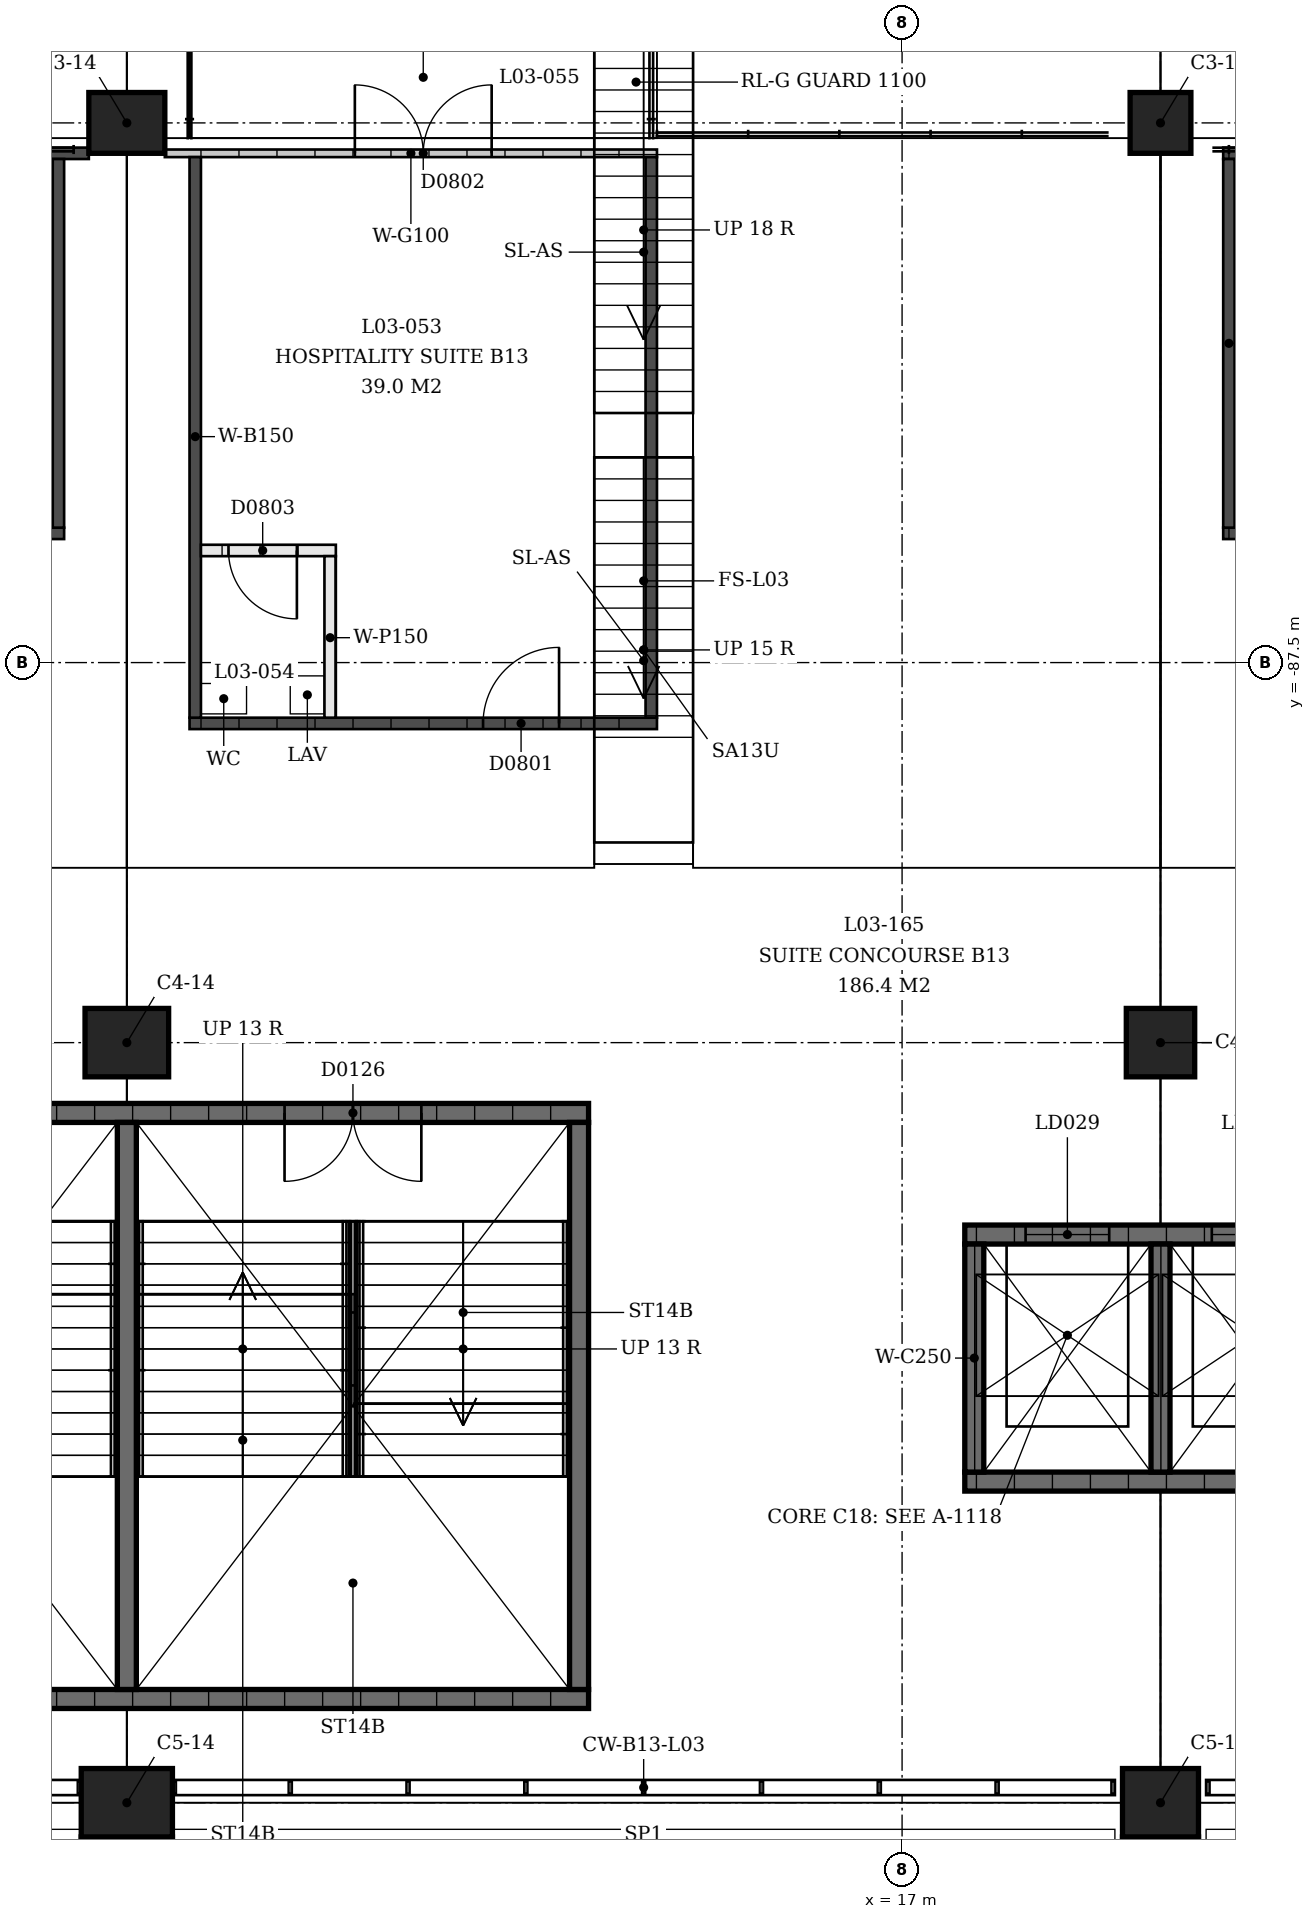
"""IFC4 building model, lengths in metres.
Left out: names, types, materials, properties, quantities, classifications, styles, units other than length and angle.
Written with IfcOpenShell. Run it as: python <this file> out.ifc"""

import sys

from ifc_helpers import new_model, si_unit, direction, frame, frame_2d, origin, origin_2d, place, context, subcontext, project, spatial, rectangle, extrude, element, fill, save


model = new_model("IFC4")
c1 = context("Model", 3, precision=1e-05, world=origin(), true_north=direction((0.0, 1.0)))
c2 = subcontext(c1, "Body", "Model", "MODEL_VIEW")
j1 = project(units=[si_unit("LENGTHUNIT", "METRE"), si_unit("PLANEANGLEUNIT", "RADIAN")], contexts=[c1])
p1 = place(None, origin())
s1 = spatial("IfcSite", under=j1, at=p1, CompositionType="ELEMENT")
p2 = place(p1, origin())
s2 = spatial("IfcBuilding", under=s1, at=p2, CompositionType="ELEMENT")
p3 = place(p2, frame((0.0, 0.0, 13.5)))
s3 = spatial("IfcBuildingStorey", under=s2, at=p3, CompositionType="ELEMENT", Elevation=13.5)
p4 = place(p3, frame((20.4, -80.4, 0.0), z_axis=(0.0, 0.0, 1.0), x_axis=(1.0, 0.0, 0.0)))
e1 = element("IfcColumn", 1, at=p4, inside=s3, PredefinedType="COLUMN", context=c2, shape_type="SweptSolid", body=[
    extrude(rectangle(XDim=0.8, YDim=0.8, at=origin_2d()), origin(), (0.0, 0.0, 1.0), 2.033),
])
p5 = place(p3, frame((20.4, -92.5, 0.0), z_axis=(0.0, 0.0, 1.0), x_axis=(1.0, 0.0, 0.0)))
e2 = element("IfcColumn", 2, at=p5, inside=s3, PredefinedType="COLUMN", context=c2, shape_type="SweptSolid", body=[
    extrude(rectangle(XDim=0.9, YDim=0.9, at=origin_2d()), origin(), (0.0, 0.0, 1.0), 4.5),
])
p6 = place(p3, frame((20.4, -102.5, 0.0), z_axis=(0.0, 0.0, 1.0), x_axis=(1.0, 0.0, 0.0)))
e3 = element("IfcColumn", 3, at=p6, inside=s3, PredefinedType="COLUMN", context=c2, shape_type="SweptSolid", body=[
    extrude(rectangle(XDim=1.0, YDim=0.9, at=origin_2d()), origin(), (0.0, 0.0, 1.0), 4.5),
])
p7 = place(p3, frame((6.8, -80.4, 0.0), z_axis=(0.0, 0.0, 1.0), x_axis=(1.0, 0.0, 0.0)))
e4 = element("IfcColumn", 4, at=p7, inside=s3, PredefinedType="COLUMN", context=c2, shape_type="SweptSolid", body=[
    extrude(rectangle(XDim=1.0, YDim=0.8, at=origin_2d()), origin(), (0.0, 0.0, 1.0), 2.033),
])
p8 = place(p3, frame((6.8, -92.5, 0.0), z_axis=(0.0, 0.0, 1.0), x_axis=(1.0, 0.0, 0.0)))
e5 = element("IfcColumn", 5, at=p8, inside=s3, PredefinedType="COLUMN", context=c2, shape_type="SweptSolid", body=[
    extrude(rectangle(XDim=1.1, YDim=0.9, at=origin_2d()), origin(), (0.0, 0.0, 1.0), 4.5),
])
p9 = place(p3, frame((6.8, -102.5, 0.0), z_axis=(0.0, 0.0, 1.0), x_axis=(1.0, 0.0, 0.0)))
e6 = element("IfcColumn", 6, at=p9, inside=s3, PredefinedType="COLUMN", context=c2, shape_type="SweptSolid", body=[
    extrude(rectangle(XDim=1.2, YDim=0.9, at=origin_2d()), origin(), (0.0, 0.0, 1.0), 4.5),
])
p10 = place(p3, frame((0.725, -93.425, 0.0), z_axis=(0.0, 0.0, 1.0), x_axis=(1.0, 0.0, 0.0)))
e7 = element("IfcWall", 7, at=p10, inside=s3, PredefinedType="SHEAR", context=c2, shape_type="SweptSolid", body=[
    extrude(rectangle(XDim=12.15, YDim=0.25, at=frame_2d((6.075, 0.0))), origin(), (0.0, 0.0, 1.0), 4.09),
])
p11 = place(p10, frame((2.2, 0.0, 0.0)))
e8 = element("IfcOpeningElement", 8, at=p11, cuts=e7, PredefinedType="OPENING", context=c2, shape_type="SweptSolid", body=[
    extrude(rectangle(XDim=1.8, YDim=2.1, at=frame_2d((0.9, 1.05))), frame((0.0, 0.125, 0.0), z_axis=(0.0, -1.0, 0.0), x_axis=(1.0, 0.0, 0.0)), (0.0, 0.0, 1.0), 0.25),
])
p12 = place(p10, frame((8.15, 0.0, 0.0)))
e9 = element("IfcOpeningElement", 9, at=p12, cuts=e7, PredefinedType="OPENING", context=c2, shape_type="SweptSolid", body=[
    extrude(rectangle(XDim=1.8, YDim=2.1, at=frame_2d((0.9, 1.05))), frame((0.0, 0.125, 0.0), z_axis=(0.0, -1.0, 0.0), x_axis=(1.0, 0.0, 0.0)), (0.0, 0.0, 1.0), 0.25),
])
p13 = place(p3, frame((0.725, -101.135, 0.0), z_axis=(0.0, 0.0, 1.0), x_axis=(1.0, 0.0, 0.0)))
e10 = element("IfcWall", 10, at=p13, inside=s3, PredefinedType="SHEAR", context=c2, shape_type="SweptSolid", body=[
    extrude(rectangle(XDim=12.15, YDim=0.25, at=frame_2d((6.075, 0.0))), origin(), (0.0, 0.0, 1.0), 4.09),
])
for number, where, z_axis, x_axis in (
    (11, (12.75, -93.55, 0.0), (0.0, 0.0, 1.0), (0.0, -1.0, 0.0)),
    (12, (6.8, -93.55, 0.0), (0.0, 0.0, 1.0), (0.0, -1.0, 0.0)),
):
    element("IfcWall", number, at=place(p3, frame(where, z_axis=z_axis, x_axis=x_axis)), inside=s3, PredefinedType="SHEAR", context=c2, shape_type="SweptSolid", body=[
        extrude(rectangle(XDim=7.46, YDim=0.25, at=frame_2d((3.73, 0.0))), origin(), (0.0, 0.0, 1.0), 4.09),
    ])
p14 = place(p3, frame((17.825, -95.025, 0.0), z_axis=(0.0, 0.0, 1.0), x_axis=(1.0, 0.0, 0.0)))
e13 = element("IfcWall", 13, at=p14, inside=s3, PredefinedType="SHEAR", context=c2, shape_type="SweptSolid", body=[
    extrude(rectangle(XDim=5.15, YDim=0.25, at=frame_2d((2.575, 0.0))), origin(), (0.0, 0.0, 1.0), 4.09),
])
p15 = place(p14, frame((0.8, 0.0, 0.0)))
e14 = element("IfcOpeningElement", 14, at=p15, cuts=e13, PredefinedType="OPENING", context=c2, shape_type="SweptSolid", body=[
    extrude(rectangle(XDim=1.1, YDim=2.1, at=frame_2d((0.55, 1.05))), frame((0.0, 0.125, 0.0), z_axis=(0.0, -1.0, 0.0), x_axis=(1.0, 0.0, 0.0)), (0.0, 0.0, 1.0), 0.25),
])
p16 = place(p14, frame((3.25, 0.0, 0.0)))
e15 = element("IfcOpeningElement", 15, at=p16, cuts=e13, PredefinedType="OPENING", context=c2, shape_type="SweptSolid", body=[
    extrude(rectangle(XDim=1.1, YDim=2.1, at=frame_2d((0.55, 1.05))), frame((0.0, 0.125, 0.0), z_axis=(0.0, -1.0, 0.0), x_axis=(1.0, 0.0, 0.0)), (0.0, 0.0, 1.0), 0.25),
])
p17 = place(p3, frame((17.825, -98.275, 0.0), z_axis=(0.0, 0.0, 1.0), x_axis=(1.0, 0.0, 0.0)))
e16 = element("IfcWall", 16, at=p17, inside=s3, PredefinedType="SHEAR", context=c2, shape_type="SweptSolid", body=[
    extrude(rectangle(XDim=5.15, YDim=0.25, at=frame_2d((2.575, 0.0))), origin(), (0.0, 0.0, 1.0), 4.09),
])
for number, where, z_axis, x_axis in (
    (17, (17.95, -95.15, 0.0), (0.0, 0.0, 1.0), (0.0, -1.0, 0.0)),
    (18, (20.4, -95.15, 0.0), (0.0, 0.0, 1.0), (0.0, -1.0, 0.0)),
):
    element("IfcWall", number, at=place(p3, frame(where, z_axis=z_axis, x_axis=x_axis)), inside=s3, PredefinedType="SHEAR", context=c2, shape_type="SweptSolid", body=[
        extrude(rectangle(XDim=3.0, YDim=0.25, at=frame_2d((1.5, 0.0))), origin(), (0.0, 0.0, 1.0), 4.09),
    ])
p18 = place(p3, frame((33.5, -80.8, 0.0), z_axis=(0.0, 0.0, 1.0), x_axis=(-1.0, 0.0, 0.0)))
e19 = element("IfcWall", 19, at=p18, inside=s3, PredefinedType="SOLIDWALL", context=c2, shape_type="SweptSolid", body=[
    extrude(rectangle(XDim=12.275, YDim=0.15, at=frame_2d((6.137, 0.0))), origin(), (0.0, 0.0, 1.0), 3.0),
])
p19 = place(p3, frame((33.175, -85.8, 0.0), z_axis=(0.0, 0.0, 1.0), x_axis=(-1.0, 0.0, 0.0)))
e20 = element("IfcWall", 20, at=p19, inside=s3, PredefinedType="SOLIDWALL", context=c2, shape_type="SweptSolid", body=[
    extrude(rectangle(XDim=11.95, YDim=0.15, at=frame_2d((5.975, 0.0))), origin(), (0.0, 0.0, 1.0), 3.0),
])
p20 = place(p19, frame((2.525, 0.0, 0.0)))
e21 = element("IfcOpeningElement", 21, at=p20, cuts=e20, PredefinedType="OPENING", context=c2, shape_type="SweptSolid", body=[
    extrude(rectangle(XDim=1.0, YDim=2.1, at=frame_2d((0.5, 1.05))), frame((0.0, 0.075, 0.0), z_axis=(0.0, -1.0, 0.0), x_axis=(1.0, 0.0, 0.0)), (0.0, 0.0, 1.0), 0.15),
])
p21 = place(p19, frame((8.425, 0.0, 0.0)))
e22 = element("IfcOpeningElement", 22, at=p21, cuts=e20, PredefinedType="OPENING", context=c2, shape_type="SweptSolid", body=[
    extrude(rectangle(XDim=1.0, YDim=2.1, at=frame_2d((0.5, 1.05))), frame((0.0, 0.075, 0.0), z_axis=(0.0, -1.0, 0.0), x_axis=(1.0, 0.0, 0.0)), (0.0, 0.0, 1.0), 0.15),
])
p22 = place(p3, frame((21.3, -80.875, 0.0), z_axis=(0.0, 0.0, 1.0), x_axis=(0.0, -1.0, 0.0)))
e23 = element("IfcWall", 23, at=p22, inside=s3, PredefinedType="SOLIDWALL", context=c2, shape_type="SweptSolid", body=[
    extrude(rectangle(XDim=4.85, YDim=0.15, at=frame_2d((2.425, 0.0))), origin(), (0.0, 0.0, 1.0), 3.0),
])
p23 = place(p3, frame((7.3, -80.8, 0.0), z_axis=(0.0, 0.0, 1.0), x_axis=(1.0, 0.0, 0.0)))
e24 = element("IfcWall", 24, at=p23, inside=s3, PredefinedType="PARTITIONING", context=c2, shape_type="SweptSolid", body=[
    extrude(rectangle(XDim=6.475, YDim=0.1, at=frame_2d((3.237, 0.0))), origin(), (0.0, 0.0, 1.0), 3.0),
])
p24 = place(p23, frame((2.5, 0.0, 0.0)))
e25 = element("IfcOpeningElement", 25, at=p24, cuts=e24, PredefinedType="OPENING", context=c2, shape_type="SweptSolid", body=[
    extrude(rectangle(XDim=1.8, YDim=2.1, at=frame_2d((0.9, 1.05))), frame((0.0, 0.05, 0.0), z_axis=(0.0, -1.0, 0.0), x_axis=(1.0, 0.0, 0.0)), (0.0, 0.0, 1.0), 0.1),
])
p25 = place(p3, frame((7.625, -88.3, 0.0), z_axis=(0.0, 0.0, 1.0), x_axis=(1.0, 0.0, 0.0)))
e26 = element("IfcWall", 26, at=p25, inside=s3, PredefinedType="SOLIDWALL", context=c2, shape_type="SweptSolid", body=[
    extrude(rectangle(XDim=6.15, YDim=0.15, at=frame_2d((3.075, 0.0))), origin(), (0.0, 0.0, 1.0), 3.0),
])
p26 = place(p25, frame((3.862, 0.0, 0.0)))
e27 = element("IfcOpeningElement", 27, at=p26, cuts=e26, PredefinedType="OPENING", context=c2, shape_type="SweptSolid", body=[
    extrude(rectangle(XDim=1.0, YDim=2.1, at=frame_2d((0.5, 1.05))), frame((0.0, 0.075, 0.0), z_axis=(0.0, -1.0, 0.0), x_axis=(1.0, 0.0, 0.0)), (0.0, 0.0, 1.0), 0.15),
])
for number, where, z_axis, x_axis in (
    (28, (7.7, -80.85, 0.0), (0.0, 0.0, 1.0), (0.0, -1.0, 0.0)),
    (29, (13.7, -80.85, 0.0), (0.0, 0.0, 1.0), (0.0, -1.0, 0.0)),
):
    element("IfcWall", number, at=place(p3, frame(where, z_axis=z_axis, x_axis=x_axis)), inside=s3, PredefinedType="SOLIDWALL", context=c2, shape_type="SweptSolid", body=[
        extrude(rectangle(XDim=7.375, YDim=0.15, at=frame_2d((3.688, 0.0))), origin(), (0.0, 0.0, 1.0), 3.0),
    ])
p27 = place(p3, frame((7.775, -86.025, 0.0), z_axis=(0.0, 0.0, 1.0), x_axis=(1.0, 0.0, 0.0)))
e30 = element("IfcWall", 30, at=p27, inside=s3, PredefinedType="PARTITIONING", context=c2, shape_type="SweptSolid", body=[
    extrude(rectangle(XDim=1.775, YDim=0.15, at=frame_2d((0.888, 0.0))), origin(), (0.0, 0.0, 1.0), 3.0),
])
p28 = place(p27, frame((0.363, 0.0, 0.0)))
e31 = element("IfcOpeningElement", 31, at=p28, cuts=e30, PredefinedType="OPENING", context=c2, shape_type="SweptSolid", body=[
    extrude(rectangle(XDim=0.9, YDim=2.1, at=frame_2d((0.45, 1.05))), frame((0.0, 0.075, 0.0), z_axis=(0.0, -1.0, 0.0), x_axis=(1.0, 0.0, 0.0)), (0.0, 0.0, 1.0), 0.15),
])
p29 = place(p3, frame((9.475, -86.1, 0.0), z_axis=(0.0, 0.0, 1.0), x_axis=(0.0, -1.0, 0.0)))
e32 = element("IfcWall", 32, at=p29, inside=s3, PredefinedType="PARTITIONING", context=c2, shape_type="SweptSolid", body=[
    extrude(rectangle(XDim=2.125, YDim=0.15, at=frame_2d((1.062, 0.0))), origin(), (0.0, 0.0, 1.0), 3.0),
])
p30 = place(p3, frame((6.3, -80.8, 0.0), z_axis=(0.0, 0.0, 1.0), x_axis=(-1.0, 0.0, 0.0)))
e33 = element("IfcWall", 33, at=p30, inside=s3, PredefinedType="SOLIDWALL", context=c2, shape_type="SweptSolid", body=[
    extrude(rectangle(XDim=12.275, YDim=0.15, at=frame_2d((6.138, 0.0))), origin(), (0.0, 0.0, 1.0), 3.0),
])
p31 = place(p3, frame((5.975, -85.8, 0.0), z_axis=(0.0, 0.0, 1.0), x_axis=(-1.0, 0.0, 0.0)))
e34 = element("IfcWall", 34, at=p31, inside=s3, PredefinedType="SOLIDWALL", context=c2, shape_type="SweptSolid", body=[
    extrude(rectangle(XDim=11.95, YDim=0.15, at=frame_2d((5.975, 0.0))), origin(), (0.0, 0.0, 1.0), 3.0),
])
p32 = place(p31, frame((2.525, 0.0, 0.0)))
e35 = element("IfcOpeningElement", 35, at=p32, cuts=e34, PredefinedType="OPENING", context=c2, shape_type="SweptSolid", body=[
    extrude(rectangle(XDim=1.0, YDim=2.1, at=frame_2d((0.5, 1.05))), frame((0.0, 0.075, 0.0), z_axis=(0.0, -1.0, 0.0), x_axis=(1.0, 0.0, 0.0)), (0.0, 0.0, 1.0), 0.15),
])
p33 = place(p31, frame((8.425, 0.0, 0.0)))
e36 = element("IfcOpeningElement", 36, at=p33, cuts=e34, PredefinedType="OPENING", context=c2, shape_type="SweptSolid", body=[
    extrude(rectangle(XDim=1.0, YDim=2.1, at=frame_2d((0.5, 1.05))), frame((0.0, 0.075, 0.0), z_axis=(0.0, -1.0, 0.0), x_axis=(1.0, 0.0, 0.0)), (0.0, 0.0, 1.0), 0.15),
])
p34 = place(p3, frame((5.9, -80.875, 0.0), z_axis=(0.0, 0.0, 1.0), x_axis=(0.0, -1.0, 0.0)))
e37 = element("IfcWall", 37, at=p34, inside=s3, PredefinedType="SOLIDWALL", context=c2, shape_type="SweptSolid", body=[
    extrude(rectangle(XDim=4.85, YDim=0.15, at=frame_2d((2.425, 0.0))), origin(), (0.0, 0.0, 1.0), 3.0),
])
p35 = place(p12, origin())
e38 = element("IfcDoor", 38, at=p35, inside=s3, OperationType="DOUBLE_DOOR_SINGLE_SWING", PredefinedType="DOOR", context=c2, shape_type="SweptSolid", body=[
    extrude(rectangle(XDim=1.8, YDim=2.1, at=frame_2d((0.9, 1.05))), frame((0.0, 0.025, 0.0), z_axis=(0.0, -1.0, 0.0), x_axis=(1.0, 0.0, 0.0)), (0.0, 0.0, 1.0), 0.05),
])
fill(e9, e38)
p36 = place(p15, origin())
e39 = element("IfcDoor", 39, at=p36, inside=s3, OperationType="SLIDING_TO_LEFT", PredefinedType="DOOR", context=c2, shape_type="SweptSolid", body=[
    extrude(rectangle(XDim=1.1, YDim=2.1, at=frame_2d((0.55, 1.05))), frame((0.0, 0.025, 0.0), z_axis=(0.0, -1.0, 0.0), x_axis=(1.0, 0.0, 0.0)), (0.0, 0.0, 1.0), 0.05),
])
fill(e14, e39)
p37 = place(p16, origin())
e40 = element("IfcDoor", 40, at=p37, inside=s3, OperationType="SLIDING_TO_LEFT", PredefinedType="DOOR", context=c2, shape_type="SweptSolid", body=[
    extrude(rectangle(XDim=1.1, YDim=2.1, at=frame_2d((0.55, 1.05))), frame((0.0, 0.025, 0.0), z_axis=(0.0, -1.0, 0.0), x_axis=(1.0, 0.0, 0.0)), (0.0, 0.0, 1.0), 0.05),
])
fill(e15, e40)
p38 = place(p26, origin())
e41 = element("IfcDoor", 41, at=p38, inside=s3, OperationType="SINGLE_SWING_LEFT", PredefinedType="DOOR", context=c2, shape_type="SweptSolid", body=[
    extrude(rectangle(XDim=1.0, YDim=2.1, at=frame_2d((0.5, 1.05))), frame((0.0, 0.025, 0.0), z_axis=(0.0, -1.0, 0.0), x_axis=(1.0, 0.0, 0.0)), (0.0, 0.0, 1.0), 0.05),
])
fill(e27, e41)
p39 = place(p24, origin())
e42 = element("IfcDoor", 42, at=p39, inside=s3, OperationType="DOUBLE_DOOR_SINGLE_SWING", PredefinedType="DOOR", context=c2, shape_type="SweptSolid", body=[
    extrude(rectangle(XDim=1.8, YDim=2.1, at=frame_2d((0.9, 1.05))), frame((0.0, 0.025, 0.0), z_axis=(0.0, -1.0, 0.0), x_axis=(1.0, 0.0, 0.0)), (0.0, 0.0, 1.0), 0.05),
])
fill(e25, e42)
p40 = place(p28, origin())
e43 = element("IfcDoor", 43, at=p40, inside=s3, OperationType="SINGLE_SWING_RIGHT", PredefinedType="DOOR", context=c2, shape_type="SweptSolid", body=[
    extrude(rectangle(XDim=0.9, YDim=2.1, at=frame_2d((0.45, 1.05))), frame((0.0, 0.025, 0.0), z_axis=(0.0, -1.0, 0.0), x_axis=(1.0, 0.0, 0.0)), (0.0, 0.0, 1.0), 0.05),
])
fill(e31, e43)
save(model, sys.argv[1])
